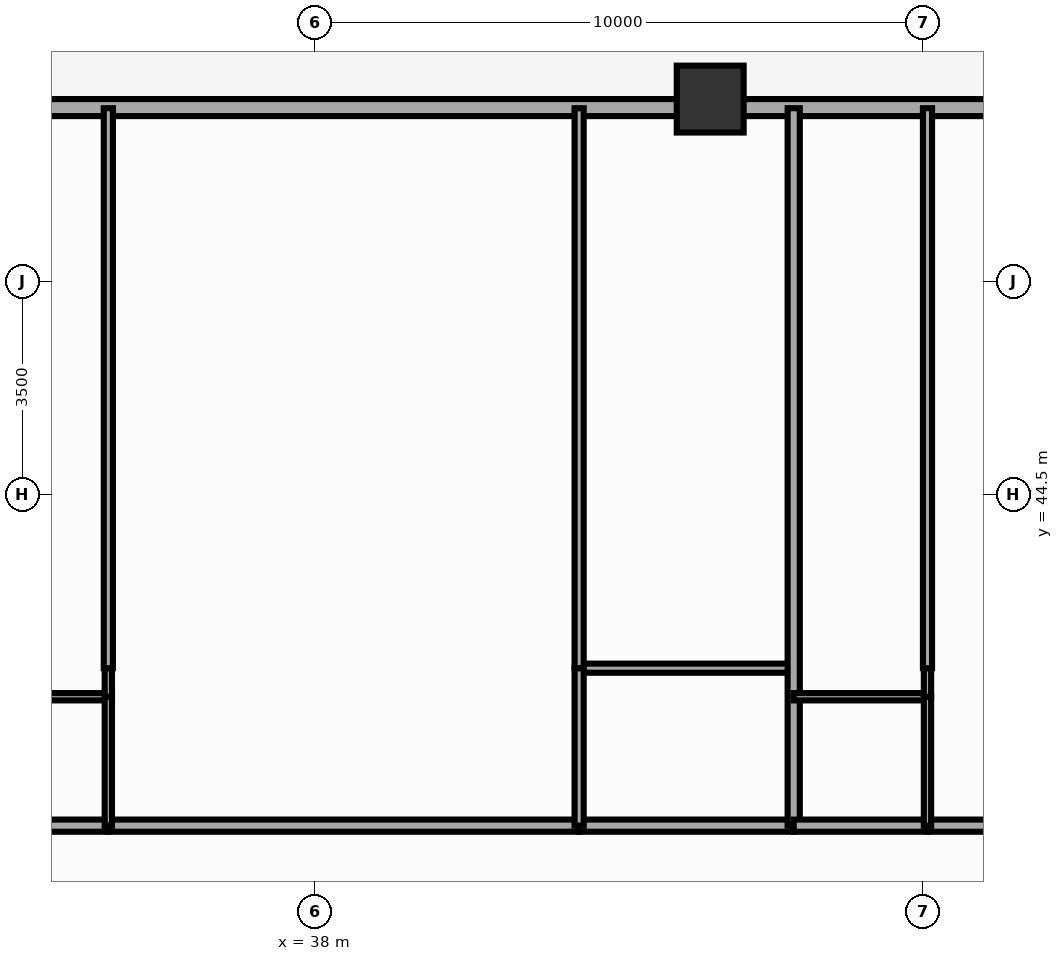
"""IFC4 building model, lengths in metres.
Left out: names, types, materials, properties, quantities, classifications, styles, units other than length and angle.
Written with IfcOpenShell. Run it as: python <this file> out.ifc"""

import sys

from ifc_helpers import new_model, si_unit, direction, frame, frame_2d, origin, origin_2d, place, context, subcontext, project, spatial, rectangle, extrude, source, transform, mapped, element, fill, save


model = new_model("IFC4")
c1 = context("Model", 3, precision=1e-05, world=origin(), true_north=direction((0.0, 1.0)))
c2 = subcontext(c1, "Body", "Model", "MODEL_VIEW")
j1 = project(units=[si_unit("LENGTHUNIT", "METRE"), si_unit("PLANEANGLEUNIT", "RADIAN")], contexts=[c1])
p1 = place(None, origin())
s1 = spatial("IfcSite", under=j1, at=p1, CompositionType="ELEMENT")
p2 = place(p1, origin())
s2 = spatial("IfcBuilding", under=s1, at=p2, CompositionType="ELEMENT")
p3 = place(p2, frame((0.0, 0.0, 19.4)))
s3 = spatial("IfcBuildingStorey", under=s2, at=p3, CompositionType="ELEMENT", Elevation=19.4)
m1 = source(origin(), c2, "Body", "SweptSolid", [
    extrude(rectangle(XDim=1.1, YDim=1.1, at=origin_2d()), origin(), (0.0, 0.0, 1.0), 3.0),
])
p4 = place(p3, frame((44.5, 51.0, 0.0), z_axis=(0.0, 0.0, 1.0), x_axis=(1.0, 0.0, 0.0)))
e1 = element("IfcColumn", 1, at=p4, inside=s3, PredefinedType="COLUMN", context=c2, shape_type="MappedRepresentation", body=[
    mapped(m1, transform((0.0, 0.0, 0.0), scale=1.0)),
])
p5 = place(p3, frame((15.5, 50.86, 0.0), z_axis=(0.0, 0.0, 1.0), x_axis=(1.0, 0.0, 0.0)))
e2 = element("IfcWall", 2, at=p5, inside=s3, PredefinedType="SOLIDWALL", context=c2, shape_type="SweptSolid", body=[
    extrude(rectangle(XDim=45.0, YDim=0.28, at=frame_2d((22.5, 0.0))), origin(), (0.0, 0.0, 1.0), 2.28),
])
p6 = place(p5, frame((0.76, 0.0, 0.25)))
e3 = element("IfcOpeningElement", 3, at=p6, cuts=e2, PredefinedType="OPENING", context=c2, shape_type="SweptSolid", body=[
    extrude(rectangle(XDim=1.2, YDim=1.5, at=frame_2d((0.6, 0.75))), frame((0.0, 0.152, 0.0), z_axis=(0.0, -1.0, 0.0), x_axis=(1.0, 0.0, 0.0)), (0.0, 0.0, 1.0), 0.304),
])
p7 = place(p5, frame((3.494, 0.0, 0.25)))
e4 = element("IfcOpeningElement", 4, at=p7, cuts=e2, PredefinedType="OPENING", context=c2, shape_type="SweptSolid", body=[
    extrude(rectangle(XDim=1.2, YDim=1.5, at=frame_2d((0.6, 0.75))), frame((0.0, 0.152, 0.0), z_axis=(0.0, -1.0, 0.0), x_axis=(1.0, 0.0, 0.0)), (0.0, 0.0, 1.0), 0.304),
])
p8 = place(p5, frame((8.741, 0.0, 0.25)))
e5 = element("IfcOpeningElement", 5, at=p8, cuts=e2, PredefinedType="OPENING", context=c2, shape_type="SweptSolid", body=[
    extrude(rectangle(XDim=1.2, YDim=1.5, at=frame_2d((0.6, 0.75))), frame((0.0, 0.152, 0.0), z_axis=(0.0, -1.0, 0.0), x_axis=(1.0, 0.0, 0.0)), (0.0, 0.0, 1.0), 0.304),
])
p9 = place(p5, frame((13.616, 0.0, 0.25)))
e6 = element("IfcOpeningElement", 6, at=p9, cuts=e2, PredefinedType="OPENING", context=c2, shape_type="SweptSolid", body=[
    extrude(rectangle(XDim=1.2, YDim=1.5, at=frame_2d((0.6, 0.75))), frame((0.0, 0.152, 0.0), z_axis=(0.0, -1.0, 0.0), x_axis=(1.0, 0.0, 0.0)), (0.0, 0.0, 1.0), 0.304),
])
p10 = place(p5, frame((17.146, 0.0, 0.25)))
e7 = element("IfcOpeningElement", 7, at=p10, cuts=e2, PredefinedType="OPENING", context=c2, shape_type="SweptSolid", body=[
    extrude(rectangle(XDim=1.2, YDim=1.5, at=frame_2d((0.6, 0.75))), frame((0.0, 0.152, 0.0), z_axis=(0.0, -1.0, 0.0), x_axis=(1.0, 0.0, 0.0)), (0.0, 0.0, 1.0), 0.304),
])
p11 = place(p5, frame((22.423, 0.0, 0.0)))
e8 = element("IfcOpeningElement", 8, at=p11, cuts=e2, PredefinedType="OPENING", context=c2, shape_type="SweptSolid", body=[
    extrude(rectangle(XDim=1.1, YDim=2.15, at=frame_2d((0.55, 1.075))), frame((0.0, 0.152, 0.0), z_axis=(0.0, -1.0, 0.0), x_axis=(1.0, 0.0, 0.0)), (0.0, 0.0, 1.0), 0.304),
])
p12 = place(p5, frame((27.252, 0.0, 0.25)))
e9 = element("IfcOpeningElement", 9, at=p12, cuts=e2, PredefinedType="OPENING", context=c2, shape_type="SweptSolid", body=[
    extrude(rectangle(XDim=0.95, YDim=1.5, at=frame_2d((0.475, 0.75))), frame((0.0, 0.152, 0.0), z_axis=(0.0, -1.0, 0.0), x_axis=(1.0, 0.0, 0.0)), (0.0, 0.0, 1.0), 0.304),
])
p13 = place(p5, frame((30.873, 0.0, 0.25)))
e10 = element("IfcOpeningElement", 10, at=p13, cuts=e2, PredefinedType="OPENING", context=c2, shape_type="SweptSolid", body=[
    extrude(rectangle(XDim=1.2, YDim=1.5, at=frame_2d((0.6, 0.75))), frame((0.0, 0.152, 0.0), z_axis=(0.0, -1.0, 0.0), x_axis=(1.0, 0.0, 0.0)), (0.0, 0.0, 1.0), 0.304),
])
p14 = place(p5, frame((33.113, 0.0, 0.25)))
e11 = element("IfcOpeningElement", 11, at=p14, cuts=e2, PredefinedType="OPENING", context=c2, shape_type="SweptSolid", body=[
    extrude(rectangle(XDim=1.2, YDim=1.5, at=frame_2d((0.6, 0.75))), frame((0.0, 0.152, 0.0), z_axis=(0.0, -1.0, 0.0), x_axis=(1.0, 0.0, 0.0)), (0.0, 0.0, 1.0), 0.304),
])
p15 = place(p5, frame((35.624, 0.0, 0.25)))
e12 = element("IfcOpeningElement", 12, at=p15, cuts=e2, PredefinedType="OPENING", context=c2, shape_type="SweptSolid", body=[
    extrude(rectangle(XDim=1.2, YDim=1.5, at=frame_2d((0.6, 0.75))), frame((0.0, 0.152, 0.0), z_axis=(0.0, -1.0, 0.0), x_axis=(1.0, 0.0, 0.0)), (0.0, 0.0, 1.0), 0.304),
])
p16 = place(p5, frame((38.097, 0.0, 0.25)))
e13 = element("IfcOpeningElement", 13, at=p16, cuts=e2, PredefinedType="OPENING", context=c2, shape_type="SweptSolid", body=[
    extrude(rectangle(XDim=1.2, YDim=1.5, at=frame_2d((0.6, 0.75))), frame((0.0, 0.152, 0.0), z_axis=(0.0, -1.0, 0.0), x_axis=(1.0, 0.0, 0.0)), (0.0, 0.0, 1.0), 0.304),
])
p17 = place(p5, frame((40.336, 0.0, 0.25)))
e14 = element("IfcOpeningElement", 14, at=p17, cuts=e2, PredefinedType="OPENING", context=c2, shape_type="SweptSolid", body=[
    extrude(rectangle(XDim=1.2, YDim=1.5, at=frame_2d((0.6, 0.75))), frame((0.0, 0.152, 0.0), z_axis=(0.0, -1.0, 0.0), x_axis=(1.0, 0.0, 0.0)), (0.0, 0.0, 1.0), 0.304),
])
p18 = place(p5, frame((42.743, 0.0, 0.25)))
e15 = element("IfcOpeningElement", 15, at=p18, cuts=e2, PredefinedType="OPENING", context=c2, shape_type="SweptSolid", body=[
    extrude(rectangle(XDim=1.2, YDim=1.5, at=frame_2d((0.6, 0.75))), frame((0.0, 0.152, 0.0), z_axis=(0.0, -1.0, 0.0), x_axis=(1.0, 0.0, 0.0)), (0.0, 0.0, 1.0), 0.304),
])
p19 = place(p3, frame((31.852, 39.05, 0.0), z_axis=(0.0, 0.0, 1.0), x_axis=(1.0, 0.0, 0.0)))
e16 = element("IfcWall", 16, at=p19, inside=s3, PredefinedType="PARTITIONING", context=c2, shape_type="SweptSolid", body=[
    extrude(rectangle(XDim=2.75, YDim=0.2, at=frame_2d((1.375, 0.0))), origin(), (0.0, 0.0, 1.0), 2.79),
])
p20 = place(p3, frame((34.602, 39.05, 0.0), z_axis=(0.0, 0.0, 1.0), x_axis=(1.0, 0.0, 0.0)))
e17 = element("IfcWall", 17, at=p20, inside=s3, PredefinedType="PARTITIONING", context=c2, shape_type="SweptSolid", body=[
    extrude(rectangle(XDim=7.743, YDim=0.2, at=frame_2d((3.871, 0.0))), origin(), (0.0, 0.0, 1.0), 2.79),
])
p21 = place(p20, frame((3.371, 0.0, 0.0)))
e18 = element("IfcOpeningElement", 18, at=p21, cuts=e17, PredefinedType="OPENING", context=c2, shape_type="SweptSolid", body=[
    extrude(rectangle(XDim=1.0, YDim=2.15, at=frame_2d((0.5, 1.075))), frame((0.0, 0.112, 0.0), z_axis=(0.0, -1.0, 0.0), x_axis=(1.0, 0.0, 0.0)), (0.0, 0.0, 1.0), 0.224),
])
p22 = place(p3, frame((42.344, 39.05, 0.0), z_axis=(0.0, 0.0, 1.0), x_axis=(1.0, 0.0, 0.0)))
e19 = element("IfcWall", 19, at=p22, inside=s3, PredefinedType="PARTITIONING", context=c2, shape_type="SweptSolid", body=[
    extrude(rectangle(XDim=3.529, YDim=0.2, at=frame_2d((1.764, 0.0))), origin(), (0.0, 0.0, 1.0), 2.79),
])
p23 = place(p3, frame((31.852, 41.17, 0.0), z_axis=(0.0, 0.0, 1.0), x_axis=(1.0, 0.0, 0.0)))
e20 = element("IfcWall", 20, at=p23, inside=s3, PredefinedType="PARTITIONING", context=c2, shape_type="SweptSolid", body=[
    extrude(rectangle(XDim=2.75, YDim=0.12, at=frame_2d((1.375, 0.0))), origin(), (0.0, 0.0, 1.0), 2.79),
])
p24 = place(p3, frame((42.344, 41.64, 0.0), z_axis=(0.0, 0.0, 1.0), x_axis=(1.0, 0.0, 0.0)))
e21 = element("IfcWall", 21, at=p24, inside=s3, PredefinedType="PARTITIONING", context=c2, shape_type="SweptSolid", body=[
    extrude(rectangle(XDim=3.529, YDim=0.15, at=frame_2d((1.764, 0.0))), origin(), (0.0, 0.0, 1.0), 2.79),
])
p25 = place(p3, frame((34.602, 39.05, 0.0), z_axis=(0.0, 0.0, 1.0), x_axis=(0.0, 1.0, 0.0)))
e22 = element("IfcWall", 22, at=p25, inside=s3, PredefinedType="PARTITIONING", context=c2, shape_type="SweptSolid", body=[
    extrude(rectangle(XDim=2.12, YDim=0.12, at=frame_2d((1.06, 0.0))), origin(), (0.0, 0.0, 1.0), 2.79),
])
p26 = place(p25, frame((0.635, 0.0, 0.0)))
e23 = element("IfcOpeningElement", 23, at=p26, cuts=e22, PredefinedType="OPENING", context=c2, shape_type="SweptSolid", body=[
    extrude(rectangle(XDim=0.85, YDim=2.05, at=frame_2d((0.425, 1.025))), frame((0.0, 0.072, 0.0), z_axis=(0.0, -1.0, 0.0), x_axis=(1.0, 0.0, 0.0)), (0.0, 0.0, 1.0), 0.144),
])
p27 = place(p3, frame((34.602, 41.17, 0.0), z_axis=(0.0, 0.0, 1.0), x_axis=(0.0, 1.0, 0.0)))
e24 = element("IfcWall", 24, at=p27, inside=s3, PredefinedType="PARTITIONING", context=c2, shape_type="SweptSolid", body=[
    extrude(rectangle(XDim=0.47, YDim=0.12, at=frame_2d((0.235, 0.0))), origin(), (0.0, 0.0, 1.0), 2.79),
])
p28 = place(p3, frame((34.602, 41.64, 0.0), z_axis=(0.0, 0.0, 1.0), x_axis=(0.0, 1.0, 0.0)))
e25 = element("IfcWall", 25, at=p28, inside=s3, PredefinedType="PARTITIONING", context=c2, shape_type="SweptSolid", body=[
    extrude(rectangle(XDim=9.21, YDim=0.15, at=frame_2d((4.605, 0.0))), origin(), (0.0, 0.0, 1.0), 2.79),
])
p29 = place(p28, frame((3.829, 0.0, 0.0)))
e26 = element("IfcOpeningElement", 26, at=p29, cuts=e25, PredefinedType="OPENING", context=c2, shape_type="SweptSolid", body=[
    extrude(rectangle(XDim=0.9, YDim=2.1, at=frame_2d((0.45, 1.05))), frame((0.0, 0.087, 0.0), z_axis=(0.0, -1.0, 0.0), x_axis=(1.0, 0.0, 0.0)), (0.0, 0.0, 1.0), 0.174),
])
p30 = place(p3, frame((42.344, 39.05, 0.0), z_axis=(0.0, 0.0, 1.0), x_axis=(0.0, 1.0, 0.0)))
e27 = element("IfcWall", 27, at=p30, inside=s3, PredefinedType="PARTITIONING", context=c2, shape_type="SweptSolid", body=[
    extrude(rectangle(XDim=2.59, YDim=0.15, at=frame_2d((1.295, 0.0))), origin(), (0.0, 0.0, 1.0), 2.79),
])
p31 = place(p30, frame((0.845, 0.0, 0.0)))
e28 = element("IfcOpeningElement", 28, at=p31, cuts=e27, PredefinedType="OPENING", context=c2, shape_type="SweptSolid", body=[
    extrude(rectangle(XDim=0.9, YDim=2.1, at=frame_2d((0.45, 1.05))), frame((0.0, 0.087, 0.0), z_axis=(0.0, -1.0, 0.0), x_axis=(1.0, 0.0, 0.0)), (0.0, 0.0, 1.0), 0.174),
])
p32 = place(p3, frame((42.344, 41.64, 0.0), z_axis=(0.0, 0.0, 1.0), x_axis=(0.0, 1.0, 0.0)))
e29 = element("IfcWall", 29, at=p32, inside=s3, PredefinedType="PARTITIONING", context=c2, shape_type="SweptSolid", body=[
    extrude(rectangle(XDim=9.21, YDim=0.15, at=frame_2d((4.605, 0.0))), origin(), (0.0, 0.0, 1.0), 2.79),
])
p33 = place(p32, frame((3.829, 0.0, 0.0)))
e30 = element("IfcOpeningElement", 30, at=p33, cuts=e29, PredefinedType="OPENING", context=c2, shape_type="SweptSolid", body=[
    extrude(rectangle(XDim=0.9, YDim=2.1, at=frame_2d((0.45, 1.05))), frame((0.0, 0.087, 0.0), z_axis=(0.0, -1.0, 0.0), x_axis=(1.0, 0.0, 0.0)), (0.0, 0.0, 1.0), 0.174),
])
p34 = place(p3, frame((45.873, 39.05, 0.0), z_axis=(0.0, 0.0, 1.0), x_axis=(0.0, 1.0, 0.0)))
e31 = element("IfcWall", 31, at=p34, inside=s3, PredefinedType="PARTITIONING", context=c2, shape_type="SweptSolid", body=[
    extrude(rectangle(XDim=11.8, YDim=0.2, at=frame_2d((5.9, 0.0))), origin(), (0.0, 0.0, 1.0), 2.79),
])
p35 = place(p3, frame((45.873, 39.05, 0.0), z_axis=(0.0, 0.0, 1.0), x_axis=(1.0, 0.0, 0.0)))
e32 = element("IfcWall", 32, at=p35, inside=s3, PredefinedType="PARTITIONING", context=c2, shape_type="SweptSolid", body=[
    extrude(rectangle(XDim=2.2, YDim=0.2, at=frame_2d((1.1, 0.0))), origin(), (0.0, 0.0, 1.0), 2.79),
])
p36 = place(p3, frame((48.073, 39.05, 0.0), z_axis=(0.0, 0.0, 1.0), x_axis=(1.0, 0.0, 0.0)))
e33 = element("IfcWall", 33, at=p36, inside=s3, PredefinedType="PARTITIONING", context=c2, shape_type="SweptSolid", body=[
    extrude(rectangle(XDim=2.278, YDim=0.2, at=frame_2d((1.139, 0.0))), origin(), (0.0, 0.0, 1.0), 2.79),
])
p37 = place(p36, frame((0.639, 0.0, 0.0)))
e34 = element("IfcOpeningElement", 34, at=p37, cuts=e33, PredefinedType="OPENING", context=c2, shape_type="SweptSolid", body=[
    extrude(rectangle(XDim=1.0, YDim=2.15, at=frame_2d((0.5, 1.075))), frame((0.0, 0.112, 0.0), z_axis=(0.0, -1.0, 0.0), x_axis=(1.0, 0.0, 0.0)), (0.0, 0.0, 1.0), 0.224),
])
p38 = place(p3, frame((45.873, 41.17, 0.0), z_axis=(0.0, 0.0, 1.0), x_axis=(1.0, 0.0, 0.0)))
e35 = element("IfcWall", 35, at=p38, inside=s3, PredefinedType="PARTITIONING", context=c2, shape_type="SweptSolid", body=[
    extrude(rectangle(XDim=2.2, YDim=0.12, at=frame_2d((1.1, 0.0))), origin(), (0.0, 0.0, 1.0), 2.79),
])
p39 = place(p3, frame((48.073, 39.05, 0.0), z_axis=(0.0, 0.0, 1.0), x_axis=(0.0, 1.0, 0.0)))
e36 = element("IfcWall", 36, at=p39, inside=s3, PredefinedType="PARTITIONING", context=c2, shape_type="SweptSolid", body=[
    extrude(rectangle(XDim=2.12, YDim=0.12, at=frame_2d((1.06, 0.0))), origin(), (0.0, 0.0, 1.0), 2.79),
])
p40 = place(p39, frame((0.635, 0.0, 0.0)))
e37 = element("IfcOpeningElement", 37, at=p40, cuts=e36, PredefinedType="OPENING", context=c2, shape_type="SweptSolid", body=[
    extrude(rectangle(XDim=0.85, YDim=2.05, at=frame_2d((0.425, 1.025))), frame((0.0, 0.072, 0.0), z_axis=(0.0, -1.0, 0.0), x_axis=(1.0, 0.0, 0.0)), (0.0, 0.0, 1.0), 0.144),
])
p41 = place(p3, frame((48.073, 41.17, 0.0), z_axis=(0.0, 0.0, 1.0), x_axis=(0.0, 1.0, 0.0)))
e38 = element("IfcWall", 38, at=p41, inside=s3, PredefinedType="PARTITIONING", context=c2, shape_type="SweptSolid", body=[
    extrude(rectangle(XDim=0.47, YDim=0.12, at=frame_2d((0.235, 0.0))), origin(), (0.0, 0.0, 1.0), 2.79),
])
p42 = place(p3, frame((48.073, 41.64, 0.0), z_axis=(0.0, 0.0, 1.0), x_axis=(0.0, 1.0, 0.0)))
e39 = element("IfcWall", 39, at=p42, inside=s3, PredefinedType="PARTITIONING", context=c2, shape_type="SweptSolid", body=[
    extrude(rectangle(XDim=9.21, YDim=0.15, at=frame_2d((4.605, 0.0))), origin(), (0.0, 0.0, 1.0), 2.79),
])
p43 = place(p42, frame((3.829, 0.0, 0.0)))
e40 = element("IfcOpeningElement", 40, at=p43, cuts=e39, PredefinedType="OPENING", context=c2, shape_type="SweptSolid", body=[
    extrude(rectangle(XDim=0.9, YDim=2.1, at=frame_2d((0.45, 1.05))), frame((0.0, 0.087, 0.0), z_axis=(0.0, -1.0, 0.0), x_axis=(1.0, 0.0, 0.0)), (0.0, 0.0, 1.0), 0.174),
])
m2 = source(origin(), c2, "Body", "SweptSolid", [
    extrude(rectangle(XDim=1.2, YDim=1.5, at=frame_2d((0.6, 0.75))), frame((0.0, 0.03, 0.0), z_axis=(0.0, -1.0, 0.0), x_axis=(1.0, 0.0, 0.0)), (0.0, 0.0, 1.0), 0.06),
])
p44 = place(p10, origin())
e41 = element("IfcWindow", 41, at=p44, inside=s3, PartitioningType="SINGLE_PANEL", PredefinedType="WINDOW", context=c2, shape_type="MappedRepresentation", body=[
    mapped(m2, transform((0.0, 0.0, 0.0), scale=1.0)),
])
fill(e7, e41)
m3 = source(origin(), c2, "Body", "SweptSolid", [
    extrude(rectangle(XDim=1.1, YDim=2.15, at=frame_2d((0.55, 1.075))), frame((0.0, 0.025, 0.0), z_axis=(0.0, -1.0, 0.0), x_axis=(1.0, 0.0, 0.0)), (0.0, 0.0, 1.0), 0.05),
])
p45 = place(p11, origin())
e42 = element("IfcDoor", 42, at=p45, inside=s3, OperationType="SINGLE_SWING_RIGHT", PredefinedType="DOOR", context=c2, shape_type="MappedRepresentation", body=[
    mapped(m3, transform((0.0, 0.0, 0.0), scale=1.0)),
])
fill(e8, e42)
m4 = source(origin(), c2, "Body", "SweptSolid", [
    extrude(rectangle(XDim=0.95, YDim=1.5, at=frame_2d((0.475, 0.75))), frame((0.0, 0.03, 0.0), z_axis=(0.0, -1.0, 0.0), x_axis=(1.0, 0.0, 0.0)), (0.0, 0.0, 1.0), 0.06),
])
p46 = place(p12, origin())
e43 = element("IfcWindow", 43, at=p46, inside=s3, PartitioningType="SINGLE_PANEL", PredefinedType="WINDOW", context=c2, shape_type="MappedRepresentation", body=[
    mapped(m4, transform((0.0, 0.0, 0.0), scale=1.0)),
])
fill(e9, e43)
p47 = place(p13, origin())
e44 = element("IfcWindow", 44, at=p47, inside=s3, PartitioningType="SINGLE_PANEL", PredefinedType="WINDOW", context=c2, shape_type="MappedRepresentation", body=[
    mapped(m2, transform((0.0, 0.0, 0.0), scale=1.0)),
])
fill(e10, e44)
p48 = place(p14, origin())
e45 = element("IfcWindow", 45, at=p48, inside=s3, PartitioningType="SINGLE_PANEL", PredefinedType="WINDOW", context=c2, shape_type="MappedRepresentation", body=[
    mapped(m2, transform((0.0, 0.0, 0.0), scale=1.0)),
])
fill(e11, e45)
m5 = source(origin(), c2, "Body", "SweptSolid", [
    extrude(rectangle(XDim=1.0, YDim=2.15, at=frame_2d((0.5, 1.075))), frame((0.0, 0.025, 0.0), z_axis=(0.0, -1.0, 0.0), x_axis=(1.0, 0.0, 0.0)), (0.0, 0.0, 1.0), 0.05),
])
p49 = place(p21, origin())
e46 = element("IfcDoor", 46, at=p49, inside=s3, OperationType="SINGLE_SWING_LEFT", PredefinedType="DOOR", context=c2, shape_type="MappedRepresentation", body=[
    mapped(m5, transform((0.0, 0.0, 0.0), scale=1.0)),
])
fill(e18, e46)
m6 = source(origin(), c2, "Body", "SweptSolid", [
    extrude(rectangle(XDim=0.85, YDim=2.05, at=frame_2d((0.425, 1.025))), frame((0.0, 0.025, 0.0), z_axis=(0.0, -1.0, 0.0), x_axis=(1.0, 0.0, 0.0)), (0.0, 0.0, 1.0), 0.05),
])
p50 = place(p26, origin())
e47 = element("IfcDoor", 47, at=p50, inside=s3, OperationType="SINGLE_SWING_RIGHT", PredefinedType="DOOR", context=c2, shape_type="MappedRepresentation", body=[
    mapped(m6, transform((0.0, 0.0, 0.0), scale=1.0)),
])
fill(e23, e47)
m7 = source(origin(), c2, "Body", "SweptSolid", [
    extrude(rectangle(XDim=0.9, YDim=2.1, at=frame_2d((0.45, 1.05))), frame((0.0, 0.025, 0.0), z_axis=(0.0, -1.0, 0.0), x_axis=(1.0, 0.0, 0.0)), (0.0, 0.0, 1.0), 0.05),
])
p51 = place(p29, origin())
e48 = element("IfcDoor", 48, at=p51, inside=s3, OperationType="SINGLE_SWING_LEFT", PredefinedType="DOOR", context=c2, shape_type="MappedRepresentation", body=[
    mapped(m7, transform((0.0, 0.0, 0.0), scale=1.0)),
])
fill(e26, e48)
p52 = place(p31, origin())
e49 = element("IfcDoor", 49, at=p52, inside=s3, OperationType="SINGLE_SWING_RIGHT", PredefinedType="DOOR", context=c2, shape_type="MappedRepresentation", body=[
    mapped(m7, transform((0.0, 0.0, 0.0), scale=1.0)),
])
fill(e28, e49)
p53 = place(p33, origin())
e50 = element("IfcDoor", 50, at=p53, inside=s3, OperationType="SINGLE_SWING_LEFT", PredefinedType="DOOR", context=c2, shape_type="MappedRepresentation", body=[
    mapped(m7, transform((0.0, 0.0, 0.0), scale=1.0)),
])
fill(e30, e50)
p54 = place(p37, origin())
e51 = element("IfcDoor", 51, at=p54, inside=s3, OperationType="SINGLE_SWING_RIGHT", PredefinedType="DOOR", context=c2, shape_type="MappedRepresentation", body=[
    mapped(m5, transform((0.0, 0.0, 0.0), scale=1.0)),
])
fill(e34, e51)
p55 = place(p40, origin())
e52 = element("IfcDoor", 52, at=p55, inside=s3, OperationType="SINGLE_SWING_LEFT", PredefinedType="DOOR", context=c2, shape_type="MappedRepresentation", body=[
    mapped(m6, transform((0.0, 0.0, 0.0), scale=1.0)),
])
fill(e37, e52)
p56 = place(p43, origin())
e53 = element("IfcDoor", 53, at=p56, inside=s3, OperationType="SINGLE_SWING_RIGHT", PredefinedType="DOOR", context=c2, shape_type="MappedRepresentation", body=[
    mapped(m7, transform((0.0, 0.0, 0.0), scale=1.0)),
])
fill(e40, e53)
save(model, sys.argv[1])
